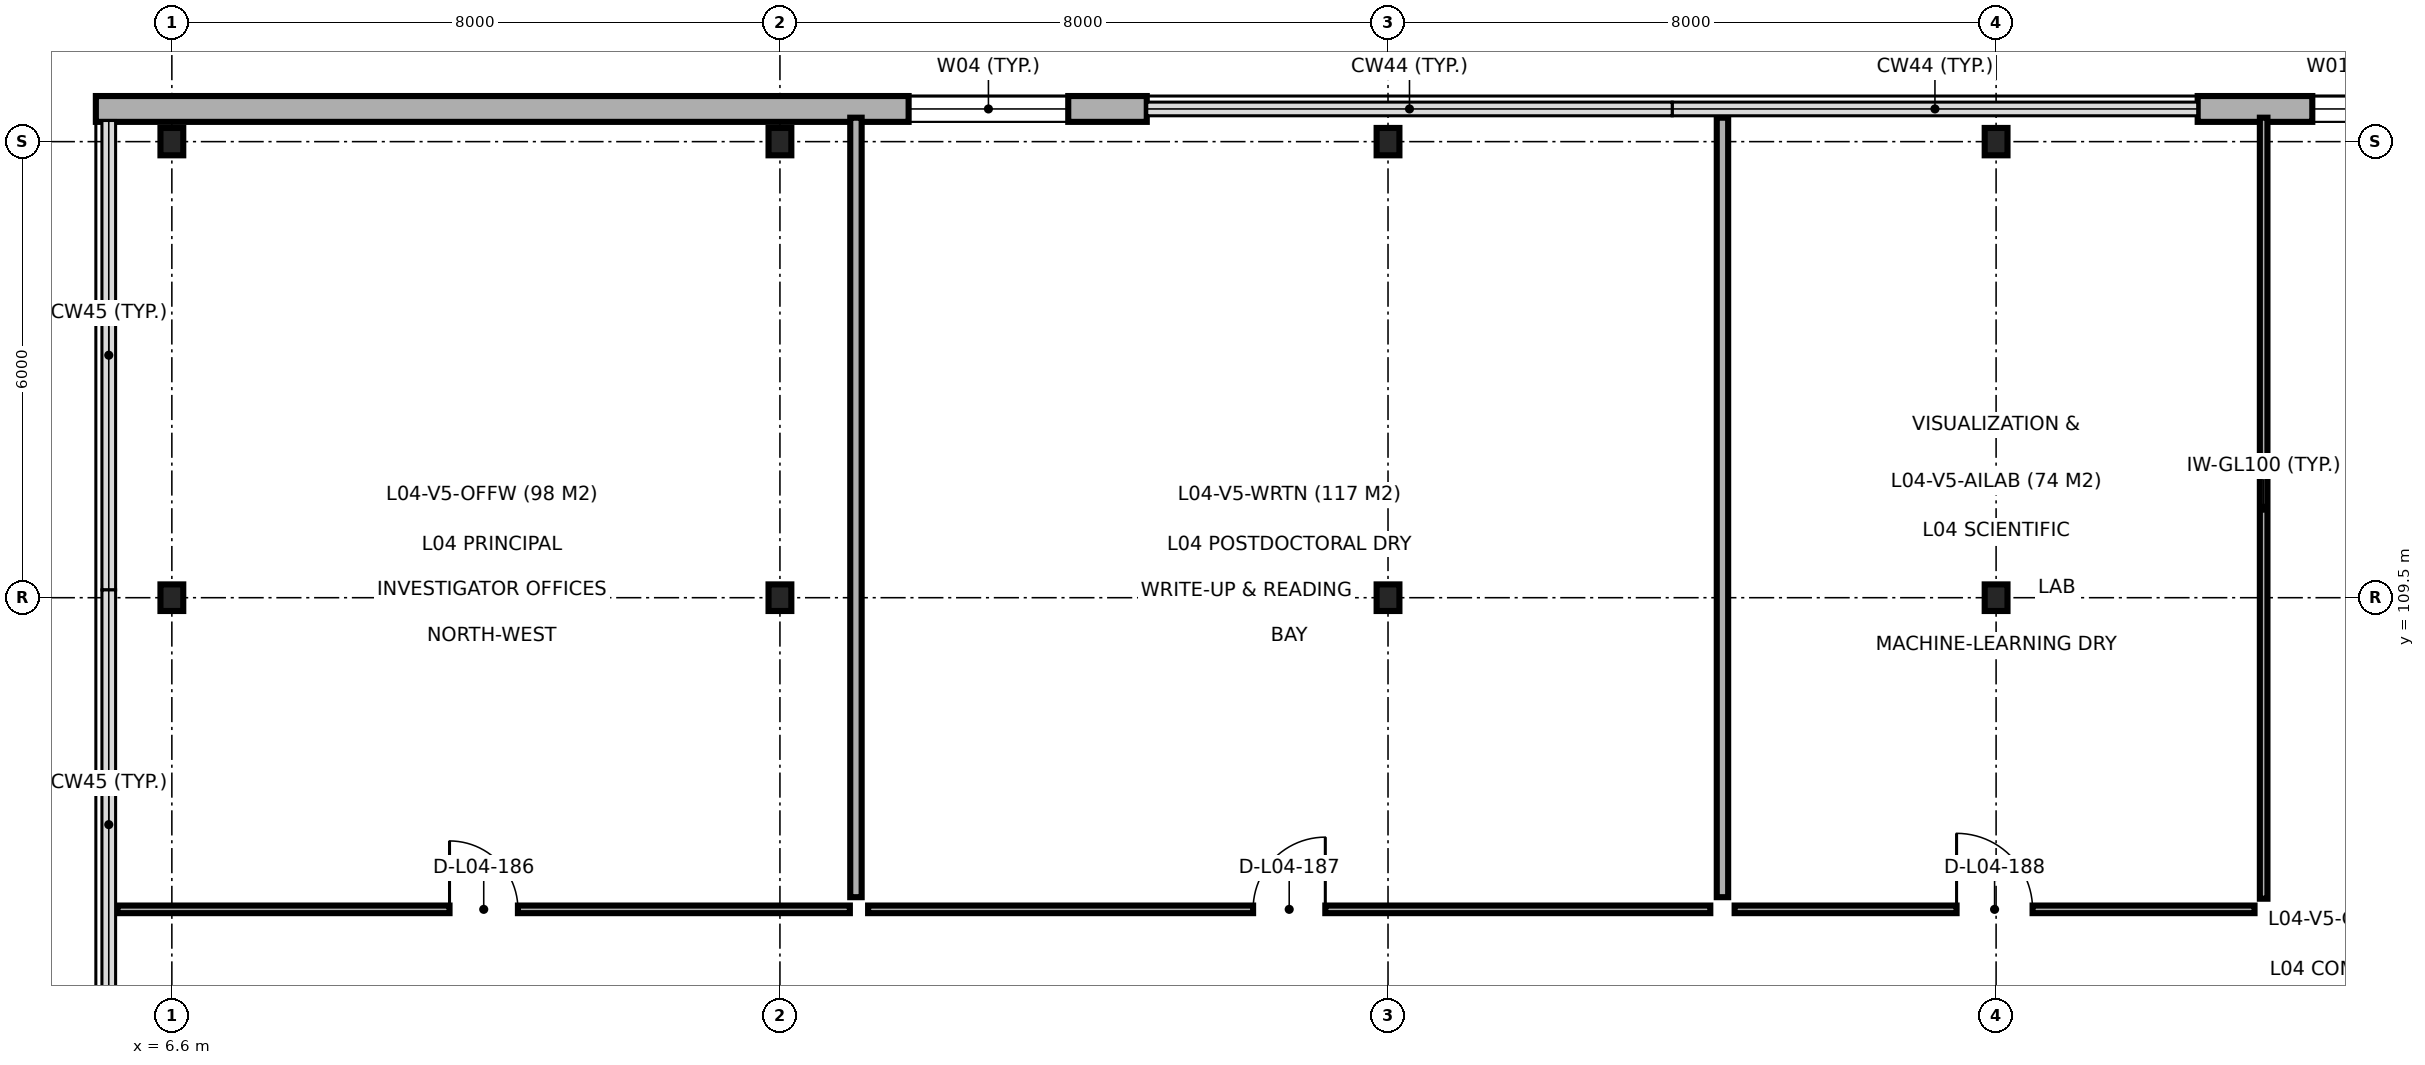
"""IFC4 building model, lengths in metres.
Left out: names, types, materials, properties, quantities, classifications, styles, units other than length and angle.
Written with IfcOpenShell. Run it as: python <this file> out.ifc"""

import sys

from ifc_helpers import new_model, si_unit, direction, frame, frame_2d, origin, origin_2d, place, context, subcontext, project, spatial, rectangle, i_section, extrude, element, fill, save


model = new_model("IFC4")
c1 = context("Model", 3, precision=1e-05, world=origin(), true_north=direction((0.0, 1.0)))
c2 = subcontext(c1, "Body", "Model", "MODEL_VIEW")
j1 = project(units=[si_unit("LENGTHUNIT", "METRE"), si_unit("PLANEANGLEUNIT", "RADIAN")], contexts=[c1])
p1 = place(None, origin())
s1 = spatial("IfcSite", under=j1, at=p1, CompositionType="ELEMENT")
p2 = place(p1, origin())
s2 = spatial("IfcBuilding", under=s1, at=p2, CompositionType="ELEMENT")
p3 = place(p2, frame((0.0, 0.0, 18.3)))
s3 = spatial("IfcBuildingStorey", under=s2, at=p3, CompositionType="ELEMENT", Elevation=18.3)
p4 = place(p3, frame((6.6, 109.5, 0.0), z_axis=(0.0, 0.0, 1.0), x_axis=(1.0, 0.0, 0.0)))
e1 = element("IfcColumn", 1, at=p4, inside=s3, PredefinedType="COLUMN", context=c2, shape_type="SweptSolid", body=[
    extrude(i_section(OverallWidth=0.3, OverallDepth=0.35, WebThickness=0.01, FlangeThickness=0.018, FilletRadius=0.027, at=origin_2d()), origin(), (0.0, 0.0, 1.0), 4.5),
])
p5 = place(p3, frame((6.6, 115.5, 0.0), z_axis=(0.0, 0.0, 1.0), x_axis=(1.0, 0.0, 0.0)))
e2 = element("IfcColumn", 2, at=p5, inside=s3, PredefinedType="COLUMN", context=c2, shape_type="SweptSolid", body=[
    extrude(i_section(OverallWidth=0.3, OverallDepth=0.36, WebThickness=0.012, FlangeThickness=0.022, FilletRadius=0.027, at=origin_2d()), origin(), (0.0, 0.0, 1.0), 4.5),
])
p6 = place(p3, frame((14.6, 109.5, 0.0), z_axis=(0.0, 0.0, 1.0), x_axis=(1.0, 0.0, 0.0)))
e3 = element("IfcColumn", 3, at=p6, inside=s3, PredefinedType="COLUMN", context=c2, shape_type="SweptSolid", body=[
    extrude(i_section(OverallWidth=0.3, OverallDepth=0.35, WebThickness=0.01, FlangeThickness=0.018, FilletRadius=0.027, at=origin_2d()), origin(), (0.0, 0.0, 1.0), 4.5),
])
p7 = place(p3, frame((14.6, 115.5, 0.0), z_axis=(0.0, 0.0, 1.0), x_axis=(1.0, 0.0, 0.0)))
e4 = element("IfcColumn", 4, at=p7, inside=s3, PredefinedType="COLUMN", context=c2, shape_type="SweptSolid", body=[
    extrude(i_section(OverallWidth=0.3, OverallDepth=0.36, WebThickness=0.012, FlangeThickness=0.022, FilletRadius=0.027, at=origin_2d()), origin(), (0.0, 0.0, 1.0), 4.5),
])
p8 = place(p3, frame((22.6, 109.5, 0.0), z_axis=(0.0, 0.0, 1.0), x_axis=(1.0, 0.0, 0.0)))
e5 = element("IfcColumn", 5, at=p8, inside=s3, PredefinedType="COLUMN", context=c2, shape_type="SweptSolid", body=[
    extrude(i_section(OverallWidth=0.3, OverallDepth=0.35, WebThickness=0.01, FlangeThickness=0.018, FilletRadius=0.027, at=origin_2d()), origin(), (0.0, 0.0, 1.0), 4.5),
])
p9 = place(p3, frame((22.6, 115.5, 0.0), z_axis=(0.0, 0.0, 1.0), x_axis=(1.0, 0.0, 0.0)))
e6 = element("IfcColumn", 6, at=p9, inside=s3, PredefinedType="COLUMN", context=c2, shape_type="SweptSolid", body=[
    extrude(i_section(OverallWidth=0.3, OverallDepth=0.36, WebThickness=0.012, FlangeThickness=0.022, FilletRadius=0.027, at=origin_2d()), origin(), (0.0, 0.0, 1.0), 4.5),
])
p10 = place(p3, frame((30.6, 109.5, 0.0), z_axis=(0.0, 0.0, 1.0), x_axis=(1.0, 0.0, 0.0)))
e7 = element("IfcColumn", 7, at=p10, inside=s3, PredefinedType="COLUMN", context=c2, shape_type="SweptSolid", body=[
    extrude(i_section(OverallWidth=0.3, OverallDepth=0.35, WebThickness=0.01, FlangeThickness=0.018, FilletRadius=0.027, at=origin_2d()), origin(), (0.0, 0.0, 1.0), 4.5),
])
p11 = place(p3, frame((30.6, 115.5, 0.0), z_axis=(0.0, 0.0, 1.0), x_axis=(1.0, 0.0, 0.0)))
e8 = element("IfcColumn", 8, at=p11, inside=s3, PredefinedType="COLUMN", context=c2, shape_type="SweptSolid", body=[
    extrude(i_section(OverallWidth=0.3, OverallDepth=0.36, WebThickness=0.012, FlangeThickness=0.022, FilletRadius=0.027, at=origin_2d()), origin(), (0.0, 0.0, 1.0), 4.5),
])
p12 = place(p3, frame((47.078, 115.93, 0.0), z_axis=(0.0, 0.0, 1.0), x_axis=(-1.0, 0.0, 0.0)))
e9 = element("IfcWall", 9, at=p12, inside=s3, PredefinedType="SOLIDWALL", context=c2, shape_type="SweptSolid", body=[
    extrude(rectangle(XDim=13.826, YDim=0.34, at=frame_2d((6.913, 0.0))), origin(), (0.0, 0.0, 1.0), 4.28),
])
p13 = place(p12, frame((9.158, 0.0, 0.9)))
e10 = element("IfcOpeningElement", 10, at=p13, cuts=e9, PredefinedType="OPENING", context=c2, shape_type="SweptSolid", body=[
    extrude(rectangle(XDim=0.9, YDim=1.8, at=frame_2d((0.45, 0.9))), frame((0.0, 0.18, 0.0), z_axis=(0.0, -1.0, 0.0), x_axis=(1.0, 0.0, 0.0)), (0.0, 0.0, 1.0), 0.36),
])
p14 = place(p12, frame((11.118, 0.0, 0.9)))
e11 = element("IfcOpeningElement", 11, at=p14, cuts=e9, PredefinedType="OPENING", context=c2, shape_type="SweptSolid", body=[
    extrude(rectangle(XDim=1.2, YDim=1.8, at=frame_2d((0.6, 0.9))), frame((0.0, 0.18, 0.0), z_axis=(0.0, -1.0, 0.0), x_axis=(1.0, 0.0, 0.0)), (0.0, 0.0, 1.0), 0.36),
])
p15 = place(p3, frame((19.426, 115.93, 0.0), z_axis=(0.0, 0.0, 1.0), x_axis=(-1.0, 0.0, 0.0)))
e12 = element("IfcWall", 12, at=p15, inside=s3, PredefinedType="SOLIDWALL", context=c2, shape_type="SweptSolid", body=[
    extrude(rectangle(XDim=13.826, YDim=0.34, at=frame_2d((6.913, 0.0))), origin(), (0.0, 0.0, 1.0), 4.28),
])
p16 = place(p15, frame((1.033, 0.0, 0.9)))
e13 = element("IfcOpeningElement", 13, at=p16, cuts=e12, PredefinedType="OPENING", context=c2, shape_type="SweptSolid", body=[
    extrude(rectangle(XDim=2.1, YDim=1.8, at=frame_2d((1.05, 0.9))), frame((0.0, 0.18, 0.0), z_axis=(0.0, -1.0, 0.0), x_axis=(1.0, 0.0, 0.0)), (0.0, 0.0, 1.0), 0.36),
])
for number, where, z_axis, x_axis in (
    (14, (15.6, 105.56, 0.0), (0.0, 0.0, 1.0), (0.0, 1.0, 0.0)),
    (15, (27.0, 105.56, 0.0), (0.0, 0.0, 1.0), (0.0, 1.0, 0.0)),
):
    element("IfcWall", number, at=place(p3, frame(where, z_axis=z_axis, x_axis=x_axis)), inside=s3, PredefinedType="PARTITIONING", context=c2, shape_type="SweptSolid", body=[
        extrude(rectangle(XDim=10.255, YDim=0.15, at=frame_2d((5.127, 0.0))), origin(), (0.0, 0.0, 1.0), 4.28),
    ])
p17 = place(p3, frame((34.12, 105.54, 0.0), z_axis=(0.0, 0.0, 1.0), x_axis=(0.0, 1.0, 0.0)))
e16 = element("IfcWall", 16, at=p17, inside=s3, PredefinedType="PARTITIONING", context=c2, shape_type="SweptSolid", body=[
    extrude(rectangle(XDim=10.275, YDim=0.1, at=frame_2d((5.137, 0.0))), origin(), (0.0, 0.0, 1.0), 4.28),
])
p18 = place(p3, frame((5.885, 105.4, 0.0), z_axis=(0.0, 0.0, 1.0), x_axis=(1.0, 0.0, 0.0)))
e17 = element("IfcWall", 17, at=p18, inside=s3, PredefinedType="PARTITIONING", context=c2, shape_type="SweptSolid", body=[
    extrude(rectangle(XDim=9.635, YDim=0.1, at=frame_2d((4.817, 0.0))), origin(), (0.0, 0.0, 1.0), 4.28),
])
p19 = place(p18, frame((4.368, 0.0, 0.0)))
e18 = element("IfcOpeningElement", 18, at=p19, cuts=e17, PredefinedType="OPENING", context=c2, shape_type="SweptSolid", body=[
    extrude(rectangle(XDim=0.9, YDim=2.1, at=frame_2d((0.45, 1.05))), frame((0.0, 0.06, 0.0), z_axis=(0.0, -1.0, 0.0), x_axis=(1.0, 0.0, 0.0)), (0.0, 0.0, 1.0), 0.12),
])
p20 = place(p3, frame((15.76, 105.4, 0.0), z_axis=(0.0, 0.0, 1.0), x_axis=(1.0, 0.0, 0.0)))
e19 = element("IfcWall", 19, at=p20, inside=s3, PredefinedType="PARTITIONING", context=c2, shape_type="SweptSolid", body=[
    extrude(rectangle(XDim=11.08, YDim=0.1, at=frame_2d((5.54, 0.0))), origin(), (0.0, 0.0, 1.0), 4.28),
])
p21 = place(p20, frame((5.065, 0.0, 0.0)))
e20 = element("IfcOpeningElement", 20, at=p21, cuts=e19, PredefinedType="OPENING", context=c2, shape_type="SweptSolid", body=[
    extrude(rectangle(XDim=0.95, YDim=2.1, at=frame_2d((0.475, 1.05))), frame((0.0, 0.06, 0.0), z_axis=(0.0, -1.0, 0.0), x_axis=(1.0, 0.0, 0.0)), (0.0, 0.0, 1.0), 0.12),
])
p22 = place(p3, frame((27.16, 105.4, 0.0), z_axis=(0.0, 0.0, 1.0), x_axis=(1.0, 0.0, 0.0)))
e21 = element("IfcWall", 21, at=p22, inside=s3, PredefinedType="PARTITIONING", context=c2, shape_type="SweptSolid", body=[
    extrude(rectangle(XDim=6.84, YDim=0.1, at=frame_2d((3.42, 0.0))), origin(), (0.0, 0.0, 1.0), 4.28),
])
p23 = place(p22, frame((2.92, 0.0, 0.0)))
e22 = element("IfcOpeningElement", 22, at=p23, cuts=e21, PredefinedType="OPENING", context=c2, shape_type="SweptSolid", body=[
    extrude(rectangle(XDim=1.0, YDim=2.15, at=frame_2d((0.5, 1.075))), frame((0.0, 0.06, 0.0), z_axis=(0.0, -1.0, 0.0), x_axis=(1.0, 0.0, 0.0)), (0.0, 0.0, 1.0), 0.12),
])
p24 = place(p14, origin())
e23 = element("IfcWindow", 23, at=p24, inside=s3, PartitioningType="SINGLE_PANEL", PredefinedType="WINDOW", context=c2, shape_type="SweptSolid", body=[
    extrude(rectangle(XDim=1.2, YDim=1.8, at=frame_2d((0.6, 0.9))), frame((0.0, 0.03, 0.0), z_axis=(0.0, -1.0, 0.0), x_axis=(1.0, 0.0, 0.0)), (0.0, 0.0, 1.0), 0.06),
])
fill(e11, e23)
p25 = place(p16, origin())
e24 = element("IfcWindow", 24, at=p25, inside=s3, PartitioningType="SINGLE_PANEL", PredefinedType="WINDOW", context=c2, shape_type="SweptSolid", body=[
    extrude(rectangle(XDim=2.1, YDim=1.8, at=frame_2d((1.05, 0.9))), frame((0.0, 0.03, 0.0), z_axis=(0.0, -1.0, 0.0), x_axis=(1.0, 0.0, 0.0)), (0.0, 0.0, 1.0), 0.06),
])
fill(e13, e24)
p26 = place(p19, origin())
e25 = element("IfcDoor", 25, at=p26, inside=s3, OperationType="SINGLE_SWING_LEFT", PredefinedType="DOOR", context=c2, shape_type="SweptSolid", body=[
    extrude(rectangle(XDim=0.9, YDim=2.1, at=frame_2d((0.45, 1.05))), frame((0.0, 0.025, 0.0), z_axis=(0.0, -1.0, 0.0), x_axis=(1.0, 0.0, 0.0)), (0.0, 0.0, 1.0), 0.05),
])
fill(e18, e25)
p27 = place(p21, origin())
e26 = element("IfcDoor", 26, at=p27, inside=s3, OperationType="SINGLE_SWING_RIGHT", PredefinedType="DOOR", context=c2, shape_type="SweptSolid", body=[
    extrude(rectangle(XDim=0.95, YDim=2.1, at=frame_2d((0.475, 1.05))), frame((0.0, 0.025, 0.0), z_axis=(0.0, -1.0, 0.0), x_axis=(1.0, 0.0, 0.0)), (0.0, 0.0, 1.0), 0.05),
])
fill(e20, e26)
p28 = place(p23, origin())
e27 = element("IfcDoor", 27, at=p28, inside=s3, OperationType="SINGLE_SWING_LEFT", PredefinedType="DOOR", context=c2, shape_type="SweptSolid", body=[
    extrude(rectangle(XDim=1.0, YDim=2.15, at=frame_2d((0.5, 1.075))), frame((0.0, 0.025, 0.0), z_axis=(0.0, -1.0, 0.0), x_axis=(1.0, 0.0, 0.0)), (0.0, 0.0, 1.0), 0.05),
])
fill(e22, e27)
save(model, sys.argv[1])
